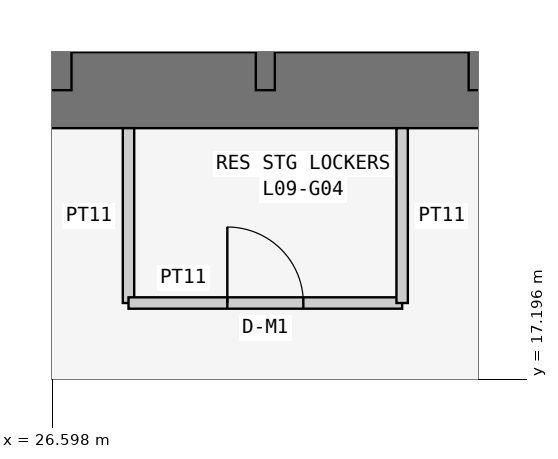
"""IFC4 building model, lengths in metres.
Left out: names, types, materials, properties, quantities, classifications, styles, units other than length and angle.
Written with IfcOpenShell. Run it as: python <this file> out.ifc"""

import sys

from ifc_helpers import new_model, si_unit, direction, frame, frame_2d, origin, place, context, subcontext, project, spatial, rectangle, extrude, element, fill, save


model = new_model("IFC4")
c1 = context("Model", 3, precision=1e-05, world=origin(), true_north=direction((0.0, 1.0)))
c2 = subcontext(c1, "Body", "Model", "MODEL_VIEW")
j1 = project(units=[si_unit("LENGTHUNIT", "METRE"), si_unit("PLANEANGLEUNIT", "RADIAN")], contexts=[c1])
p1 = place(None, origin())
s1 = spatial("IfcSite", under=j1, at=p1, CompositionType="ELEMENT")
p2 = place(p1, origin())
s2 = spatial("IfcBuilding", under=s1, at=p2, CompositionType="ELEMENT")
p3 = place(p2, frame((0.0, 0.0, 41.7)))
s3 = spatial("IfcBuildingStorey", under=s2, at=p3, CompositionType="ELEMENT", Elevation=41.7)
p4 = place(p3, frame((21.0, 21.0, 0.0), z_axis=(0.0, 0.0, 1.0), x_axis=(1.0, 0.0, 0.0)))
e1 = element("IfcWall", 1, at=p4, inside=s3, PredefinedType="SHEAR", context=c2, shape_type="SweptSolid", body=[
    extrude(rectangle(XDim=17.3, YDim=1.0, at=frame_2d((8.65, 0.0))), origin(), (0.0, 0.0, 1.0), 3.6),
])
p5 = place(p3, frame((26.6, 21.0, 0.0), z_axis=(0.0, 0.0, 1.0), x_axis=(0.0, 1.0, 0.0)))
e2 = element("IfcWall", 2, at=p5, inside=s3, PredefinedType="SHEAR", context=c2, shape_type="SweptSolid", body=[
    extrude(rectangle(XDim=16.8, YDim=0.5, at=frame_2d((8.4, 0.0))), origin(), (0.0, 0.0, 1.0), 3.6),
])
p6 = place(p5, frame((10.4, 0.0, 0.0)))
e3 = element("IfcOpeningElement", 3, at=p6, cuts=e2, PredefinedType="OPENING", context=c2, shape_type="SweptSolid", body=[
    extrude(rectangle(XDim=1.2, YDim=2.1, at=frame_2d((0.6, 1.05))), frame((0.0, 0.26, 0.0), z_axis=(0.0, -1.0, 0.0), x_axis=(1.0, 0.0, 0.0)), (0.0, 0.0, 1.0), 0.52),
])
for number, where, z_axis, x_axis in (
    (4, (29.4, 21.0, 0.0), (0.0, 0.0, 1.0), (0.0, 1.0, 0.0)),
    (5, (32.2, 21.0, 0.0), (0.0, 0.0, 1.0), (0.0, 1.0, 0.0)),
):
    element("IfcWall", number, at=place(p3, frame(where, z_axis=z_axis, x_axis=x_axis)), inside=s3, PredefinedType="SHEAR", context=c2, shape_type="SweptSolid", body=[
        extrude(rectangle(XDim=3.2, YDim=0.25, at=frame_2d((1.6, 0.0))), origin(), (0.0, 0.0, 1.0), 3.6),
    ])
p7 = place(p3, frame((27.6, 20.5, 0.0), z_axis=(0.0, 0.0, 1.0), x_axis=(0.0, -1.0, 0.0)))
e6 = element("IfcWall", 6, at=p7, inside=s3, PredefinedType="PARTITIONING", context=c2, shape_type="SweptSolid", body=[
    extrude(rectangle(XDim=2.3, YDim=0.15, at=frame_2d((1.15, 0.0))), origin(), (0.0, 0.0, 1.0), 3.45),
])
p8 = place(p3, frame((27.6, 18.2, 0.0), z_axis=(0.0, 0.0, 1.0), x_axis=(1.0, 0.0, 0.0)))
e7 = element("IfcWall", 7, at=p8, inside=s3, PredefinedType="PARTITIONING", context=c2, shape_type="SweptSolid", body=[
    extrude(rectangle(XDim=3.6, YDim=0.15, at=frame_2d((1.8, 0.0))), origin(), (0.0, 0.0, 1.0), 3.45),
])
p9 = place(p8, frame((1.3, 0.0, 0.0)))
e8 = element("IfcOpeningElement", 8, at=p9, cuts=e7, PredefinedType="OPENING", context=c2, shape_type="SweptSolid", body=[
    extrude(rectangle(XDim=1.0, YDim=2.1, at=frame_2d((0.5, 1.05))), frame((0.0, 0.085, 0.0), z_axis=(0.0, -1.0, 0.0), x_axis=(1.0, 0.0, 0.0)), (0.0, 0.0, 1.0), 0.17),
])
p10 = place(p3, frame((31.2, 18.2, 0.0), z_axis=(0.0, 0.0, 1.0), x_axis=(0.0, 1.0, 0.0)))
e9 = element("IfcWall", 9, at=p10, inside=s3, PredefinedType="PARTITIONING", context=c2, shape_type="SweptSolid", body=[
    extrude(rectangle(XDim=2.3, YDim=0.15, at=frame_2d((1.15, 0.0))), origin(), (0.0, 0.0, 1.0), 3.45),
])
p11 = place(p9, origin())
e10 = element("IfcDoor", 10, at=p11, inside=s3, OperationType="SINGLE_SWING_LEFT", PredefinedType="DOOR", context=c2, shape_type="SweptSolid", body=[
    extrude(rectangle(XDim=1.0, YDim=2.1, at=frame_2d((0.5, 1.05))), frame((0.0, 0.025, 0.0), z_axis=(0.0, -1.0, 0.0), x_axis=(1.0, 0.0, 0.0)), (0.0, 0.0, 1.0), 0.05),
])
fill(e8, e10)
save(model, sys.argv[1])
